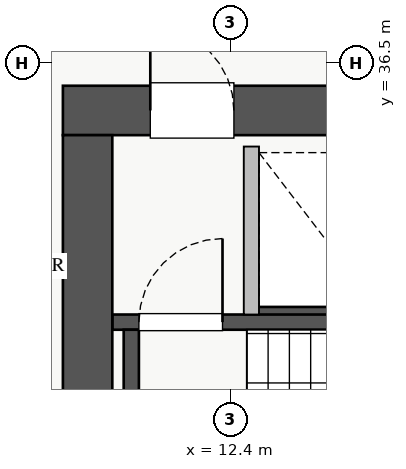
"""IFC4 building model, lengths in metres.
Left out: names, types, materials, properties, quantities, classifications, styles, units other than length and angle.
Written with IfcOpenShell. Run it as: python <this file> out.ifc"""

import sys

from ifc_helpers import new_model, si_unit, direction, frame, frame_2d, origin, place, context, subcontext, project, spatial, rectangle, extrude, source, transform, mapped, element, fill, save


model = new_model("IFC4")
c1 = context("Model", 3, precision=1e-05, world=origin(), true_north=direction((0.0, 1.0)))
c2 = subcontext(c1, "Body", "Model", "MODEL_VIEW")
j1 = project(units=[si_unit("LENGTHUNIT", "METRE"), si_unit("PLANEANGLEUNIT", "RADIAN")], contexts=[c1])
p1 = place(None, origin())
s1 = spatial("IfcSite", under=j1, at=p1, CompositionType="ELEMENT")
p2 = place(p1, origin())
s2 = spatial("IfcBuilding", under=s1, at=p2, CompositionType="ELEMENT")
p3 = place(p2, frame((0.0, 0.0, 182.75)))
s3 = spatial("IfcBuildingStorey", under=s2, at=p3, CompositionType="ELEMENT", Elevation=182.75)
p4 = place(p3, frame((12.68, 33.2, 0.0), z_axis=(0.0, 0.0, 1.0), x_axis=(1.0, 0.0, 0.0)))
e1 = element("IfcWall", 1, at=p4, inside=s3, PredefinedType="SHEAR", context=c2, shape_type="SweptSolid", body=[
    extrude(rectangle(XDim=1.94, YDim=0.18, at=frame_2d((0.97, 0.0))), origin(), (0.0, 0.0, 1.0), 3.03),
])
p5 = place(p3, frame((10.85, 33.09, 0.0), z_axis=(0.0, 0.0, 1.0), x_axis=(1.0, 0.0, 0.0)))
e2 = element("IfcWall", 2, at=p5, inside=s3, PredefinedType="SHEAR", context=c2, shape_type="SweptSolid", body=[
    extrude(rectangle(XDim=7.3, YDim=0.2, at=frame_2d((3.65, 0.0))), origin(), (0.0, 0.0, 1.0), 3.25),
])
p6 = place(p5, frame((0.35, 0.0, 0.0)))
e3 = element("IfcOpeningElement", 3, at=p6, cuts=e2, PredefinedType="OPENING", context=c2, shape_type="SweptSolid", body=[
    extrude(rectangle(XDim=1.1, YDim=2.05, at=frame_2d((0.55, 1.025))), frame((0.0, 0.11, 0.0), z_axis=(0.0, -1.0, 0.0), x_axis=(1.0, 0.0, 0.0)), (0.0, 0.0, 1.0), 0.22),
])
p7 = place(p3, frame((11.1, 30.05, 0.0), z_axis=(0.0, 0.0, 1.0), x_axis=(0.0, 1.0, 0.0)))
e4 = element("IfcWall", 4, at=p7, inside=s3, PredefinedType="SHEAR", context=c2, shape_type="SweptSolid", body=[
    extrude(rectangle(XDim=2.94, YDim=0.2, at=frame_2d((1.47, 0.0))), origin(), (0.0, 0.0, 1.0), 3.25),
])
p8 = place(p3, frame((10.2, 35.875, 0.0), z_axis=(0.0, 0.0, 1.0), x_axis=(1.0, 0.0, 0.0)))
e5 = element("IfcWall", 5, at=p8, inside=s3, PredefinedType="SHEAR", context=c2, shape_type="SweptSolid", body=[
    extrude(rectangle(XDim=17.6, YDim=0.65, at=frame_2d((8.8, 0.0))), origin(), (0.0, 0.0, 1.0), 3.25),
])
p9 = place(p8, frame((1.15, 0.0, 0.0)))
e6 = element("IfcOpeningElement", 6, at=p9, cuts=e5, PredefinedType="OPENING", context=c2, shape_type="SweptSolid", body=[
    extrude(rectangle(XDim=1.1, YDim=2.05, at=frame_2d((0.55, 1.025))), frame((0.0, 0.335, 0.0), z_axis=(0.0, -1.0, 0.0), x_axis=(1.0, 0.0, 0.0)), (0.0, 0.0, 1.0), 0.67),
])
p10 = place(p8, frame((8.3, 0.0, 0.0)))
e7 = element("IfcOpeningElement", 7, at=p10, cuts=e5, PredefinedType="OPENING", context=c2, shape_type="SweptSolid", body=[
    extrude(rectangle(XDim=1.1, YDim=2.05, at=frame_2d((0.55, 1.025))), frame((0.0, 0.335, 0.0), z_axis=(0.0, -1.0, 0.0), x_axis=(1.0, 0.0, 0.0)), (0.0, 0.0, 1.0), 0.67),
])
p11 = place(p8, frame((4.9, 0.0, 0.0)))
e8 = element("IfcOpeningElement", 8, at=p11, cuts=e5, PredefinedType="OPENING", context=c2, shape_type="SweptSolid", body=[
    extrude(rectangle(XDim=1.1, YDim=2.05, at=frame_2d((0.55, 1.025))), frame((0.0, 0.335, 0.0), z_axis=(0.0, -1.0, 0.0), x_axis=(1.0, 0.0, 0.0)), (0.0, 0.0, 1.0), 0.67),
])
p12 = place(p8, frame((14.74, 0.0, 0.0)))
e9 = element("IfcOpeningElement", 9, at=p12, cuts=e5, PredefinedType="OPENING", context=c2, shape_type="SweptSolid", body=[
    extrude(rectangle(XDim=1.0, YDim=2.05, at=frame_2d((0.5, 1.025))), frame((0.0, 0.335, 0.0), z_axis=(0.0, -1.0, 0.0), x_axis=(1.0, 0.0, 0.0)), (0.0, 0.0, 1.0), 0.67),
])
p13 = place(p8, frame((10.005, 0.0, 0.0)))
e10 = element("IfcOpeningElement", 10, at=p13, cuts=e5, PredefinedType="OPENING", context=c2, shape_type="SweptSolid", body=[
    extrude(rectangle(XDim=1.0, YDim=2.05, at=frame_2d((0.5, 1.025))), frame((0.0, 0.335, 0.0), z_axis=(0.0, -1.0, 0.0), x_axis=(1.0, 0.0, 0.0)), (0.0, 0.0, 1.0), 0.67),
])
p14 = place(p8, frame((11.55, 0.0, 0.0)))
e11 = element("IfcOpeningElement", 11, at=p14, cuts=e5, PredefinedType="OPENING", context=c2, shape_type="SweptSolid", body=[
    extrude(rectangle(XDim=1.0, YDim=2.05, at=frame_2d((0.5, 1.025))), frame((0.0, 0.335, 0.0), z_axis=(0.0, -1.0, 0.0), x_axis=(1.0, 0.0, 0.0)), (0.0, 0.0, 1.0), 0.67),
])
p15 = place(p8, frame((13.215, 0.0, 0.0)))
e12 = element("IfcOpeningElement", 12, at=p15, cuts=e5, PredefinedType="OPENING", context=c2, shape_type="SweptSolid", body=[
    extrude(rectangle(XDim=1.0, YDim=2.05, at=frame_2d((0.5, 1.025))), frame((0.0, 0.335, 0.0), z_axis=(0.0, -1.0, 0.0), x_axis=(1.0, 0.0, 0.0)), (0.0, 0.0, 1.0), 0.67),
])
p16 = place(p3, frame((10.525, 29.65, 0.0), z_axis=(0.0, 0.0, 1.0), x_axis=(0.0, 1.0, 0.0)))
e13 = element("IfcWall", 13, at=p16, inside=s3, PredefinedType="SHEAR", context=c2, shape_type="SweptSolid", body=[
    extrude(rectangle(XDim=5.9, YDim=0.65, at=frame_2d((2.95, 0.0))), origin(), (0.0, 0.0, 1.0), 3.25),
])
p17 = place(p3, frame((12.68, 33.19, 0.0), z_axis=(0.0, 0.0, 1.0), x_axis=(0.0, 1.0, 0.0)))
e14 = element("IfcWall", 14, at=p17, inside=s3, PredefinedType="PARTITIONING", context=c2, shape_type="SweptSolid", body=[
    extrude(rectangle(XDim=2.21, YDim=0.2, at=frame_2d((1.105, 0.0))), origin(), (0.0, 0.0, 1.0), 3.03),
])
m1 = source(origin(), c2, "Body", "SweptSolid", [
    extrude(rectangle(XDim=1.1, YDim=2.05, at=frame_2d((0.55, 1.025))), frame((0.0, 0.025, 0.0), z_axis=(0.0, -1.0, 0.0), x_axis=(1.0, 0.0, 0.0)), (0.0, 0.0, 1.0), 0.05),
])
p18 = place(p9, origin())
e15 = element("IfcDoor", 15, at=p18, inside=s3, OperationType="SINGLE_SWING_LEFT", PredefinedType="DOOR", context=c2, shape_type="MappedRepresentation", body=[
    mapped(m1, transform((0.0, 0.0, 0.0), x_axis=(1.0, 0.0, 0.0), y_axis=(0.0, 1.0, 0.0), z_axis=(0.0, 0.0, 1.0), scale=1.0)),
])
fill(e6, e15)
p19 = place(p6, origin())
e16 = element("IfcDoor", 16, at=p19, inside=s3, OperationType="SINGLE_SWING_RIGHT", PredefinedType="DOOR", context=c2, shape_type="MappedRepresentation", body=[
    mapped(m1, transform((0.0, 0.0, 0.0), x_axis=(1.0, 0.0, 0.0), y_axis=(0.0, 1.0, 0.0), z_axis=(0.0, 0.0, 1.0), scale=1.0)),
])
fill(e3, e16)
save(model, sys.argv[1])
